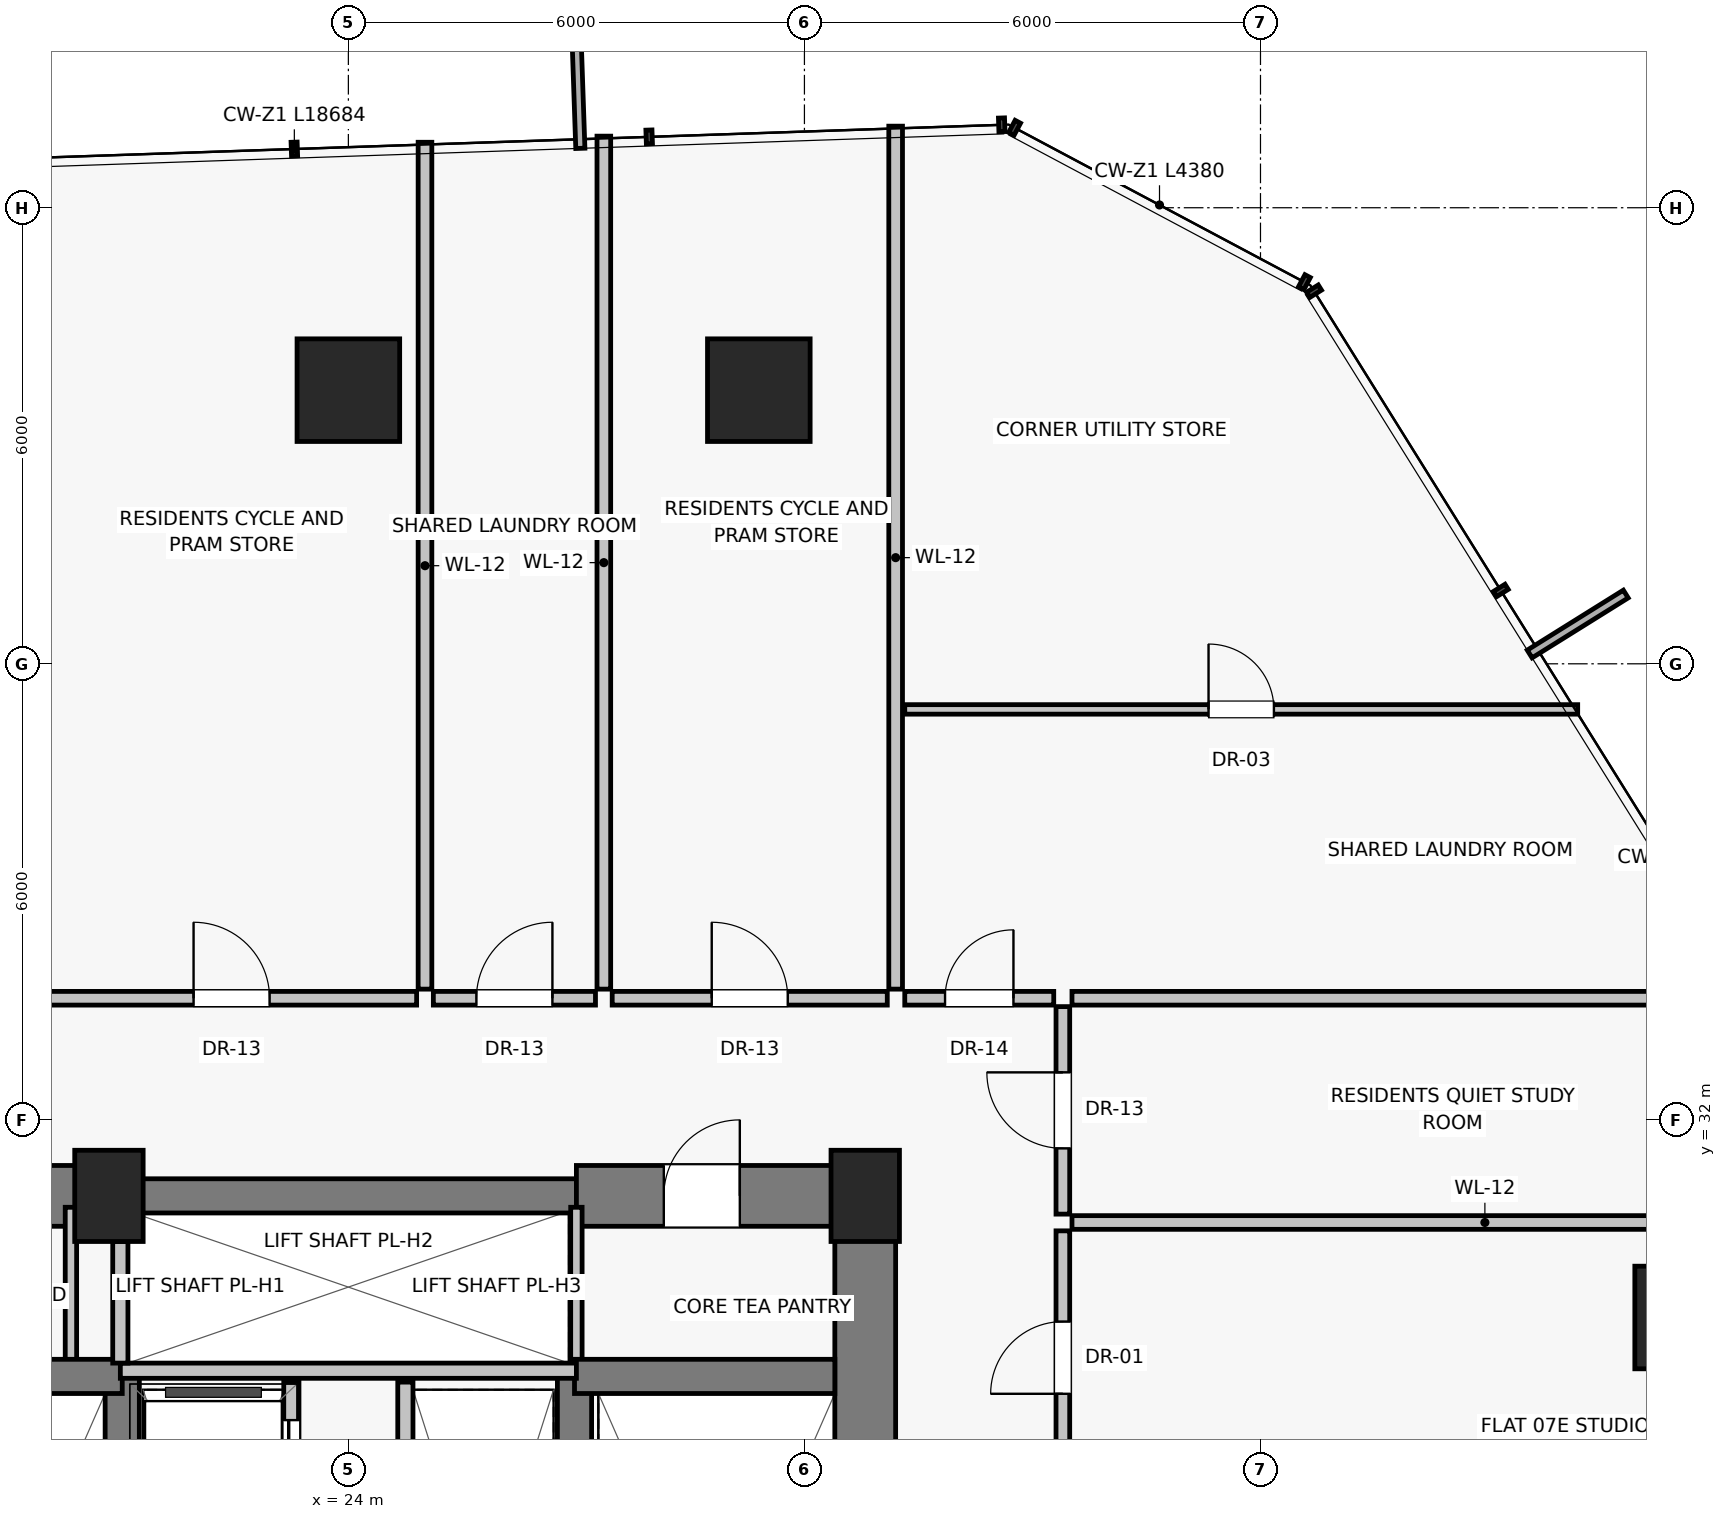
"""IFC4 building model, lengths in metres.
Left out: names, types, materials, properties, quantities, classifications, styles, units other than length and angle.
Written with IfcOpenShell. Run it as: python <this file> out.ifc"""

import sys

from ifc_helpers import new_model, si_unit, direction, frame, frame_2d, origin, origin_2d, place, context, subcontext, project, spatial, rectangle, extrude, source, transform, mapped, element, fill, save


model = new_model("IFC4")
c1 = context("Model", 3, precision=1e-05, world=origin(), true_north=direction((0.0, 1.0)))
c2 = subcontext(c1, "Body", "Model", "MODEL_VIEW")
j1 = project(units=[si_unit("LENGTHUNIT", "METRE"), si_unit("PLANEANGLEUNIT", "RADIAN")], contexts=[c1])
p1 = place(None, origin())
s1 = spatial("IfcSite", under=j1, at=p1, CompositionType="ELEMENT")
p2 = place(p1, origin())
s2 = spatial("IfcBuilding", under=s1, at=p2, CompositionType="ELEMENT")
p3 = place(p2, frame((0.0, 0.0, 30.55)))
s3 = spatial("IfcBuildingStorey", under=s2, at=p3, CompositionType="ELEMENT", Elevation=30.55)
for number, where, z_axis, x_axis in (
    (1, (20.85, 31.0, 0.0), (0.0, 0.0, 1.0), (1.0, 0.0, 0.0)),
    (2, (30.8, 31.0, 0.0), (0.0, 0.0, 1.0), (1.0, 0.0, 0.0)),
):
    element("IfcColumn", number, at=place(p3, frame(where, z_axis=z_axis, x_axis=x_axis)), inside=s3, PredefinedType="PILASTER", context=c2, shape_type="SweptSolid", body=[
        extrude(rectangle(XDim=0.9, YDim=1.2, at=origin_2d()), origin(), (0.0, 0.0, 1.0), 3.25),
    ])
for number, where, z_axis, x_axis in (
    (3, (41.6, 29.4, 0.0), (0.0, 0.0, 1.0), (1.0, 0.0, 0.0)),
    (4, (29.4, 41.6, 0.0), (0.0, 0.0, 1.0), (1.0, 0.0, 0.0)),
    (5, (24.0, 41.6, 0.0), (0.0, 0.0, 1.0), (1.0, 0.0, 0.0)),
):
    element("IfcColumn", number, at=place(p3, frame(where, z_axis=z_axis, x_axis=x_axis)), inside=s3, PredefinedType="COLUMN", context=c2, shape_type="SweptSolid", body=[
        extrude(rectangle(XDim=1.35, YDim=1.35, at=origin_2d()), origin(), (0.0, 0.0, 1.0), 3.25),
    ])
p4 = place(p3, frame((30.8, 16.8, 0.0), z_axis=(0.0, 0.0, 1.0), x_axis=(0.0, 1.0, 0.0)))
e6 = element("IfcWall", 6, at=p4, inside=s3, PredefinedType="SHEAR", context=c2, shape_type="SweptSolid", body=[
    extrude(rectangle(XDim=14.2, YDim=0.8, at=frame_2d((7.1, 0.0))), origin(), (0.0, 0.0, 1.0), 3.0),
])
p5 = place(p3, frame((17.2, 31.0, 0.0), z_axis=(0.0, 0.0, 1.0), x_axis=(1.0, 0.0, 0.0)))
e7 = element("IfcWall", 7, at=p5, inside=s3, PredefinedType="SHEAR", context=c2, shape_type="SweptSolid", body=[
    extrude(rectangle(XDim=3.8, YDim=0.8, at=frame_2d((1.9, 0.0))), origin(), (0.0, 0.0, 1.0), 3.0),
])
p6 = place(p5, frame((1.25, 0.0, 0.0)))
e8 = element("IfcOpeningElement", 8, at=p6, cuts=e7, PredefinedType="OPENING", context=c2, shape_type="SweptSolid", body=[
    extrude(rectangle(XDim=0.86, YDim=2.01, at=frame_2d((0.43, 1.005))), frame((0.0, 0.41, 0.0), z_axis=(0.0, -1.0, 0.0), x_axis=(1.0, 0.0, 0.0)), (0.0, 0.0, 1.0), 0.82),
])
p7 = place(p3, frame((21.0, 31.0, 0.0), z_axis=(0.0, 0.0, 1.0), x_axis=(1.0, 0.0, 0.0)))
e9 = element("IfcWall", 9, at=p7, inside=s3, PredefinedType="SHEAR", context=c2, shape_type="SweptSolid", body=[
    extrude(rectangle(XDim=6.0, YDim=0.45, at=frame_2d((3.0, 0.0))), origin(), (0.0, 0.0, 1.0), 3.0),
])
p8 = place(p3, frame((27.0, 31.0, 0.0), z_axis=(0.0, 0.0, 1.0), x_axis=(1.0, 0.0, 0.0)))
e10 = element("IfcWall", 10, at=p8, inside=s3, PredefinedType="SHEAR", context=c2, shape_type="SweptSolid", body=[
    extrude(rectangle(XDim=3.8, YDim=0.8, at=frame_2d((1.9, 0.0))), origin(), (0.0, 0.0, 1.0), 3.0),
])
p9 = place(p8, frame((1.15, 0.0, 0.0)))
e11 = element("IfcOpeningElement", 11, at=p9, cuts=e10, PredefinedType="OPENING", context=c2, shape_type="SweptSolid", body=[
    extrude(rectangle(XDim=1.0, YDim=2.01, at=frame_2d((0.5, 1.005))), frame((0.0, 0.41, 0.0), z_axis=(0.0, -1.0, 0.0), x_axis=(1.0, 0.0, 0.0)), (0.0, 0.0, 1.0), 0.82),
])
for number, where, z_axis, x_axis in (
    (12, (20.35, 28.65, 0.0), (0.0, 0.0, 1.0), (0.0, 1.0, 0.0)),
    (13, (27.0, 28.65, 0.0), (0.0, 0.0, 1.0), (0.0, 1.0, 0.0)),
):
    element("IfcWall", number, at=place(p3, frame(where, z_axis=z_axis, x_axis=x_axis)), inside=s3, PredefinedType="PARTITIONING", context=c2, shape_type="SweptSolid", body=[
        extrude(rectangle(XDim=2.2, YDim=0.15, at=frame_2d((1.1, 0.0))), origin(), (0.0, 0.0, 1.0), 3.0),
    ])
for number, where, z_axis, x_axis in (
    (14, (21.025, 19.8, 0.0), (0.0, 0.0, 1.0), (0.0, 1.0, 0.0)),
    (15, (26.975, 19.8, 0.0), (0.0, 0.0, 1.0), (0.0, 1.0, 0.0)),
):
    element("IfcWall", number, at=place(p3, frame(where, z_axis=z_axis, x_axis=x_axis)), inside=s3, PredefinedType="SHEAR", context=c2, shape_type="SweptSolid", body=[
        extrude(rectangle(XDim=8.825, YDim=0.45, at=frame_2d((4.413, 0.0))), origin(), (0.0, 0.0, 1.0), 3.0),
    ])
for number, where, z_axis, x_axis in (
    (16, (17.6, 28.625, 0.0), (0.0, 0.0, 1.0), (1.0, 0.0, 0.0)),
    (17, (26.975, 28.625, 0.0), (0.0, 0.0, 1.0), (1.0, 0.0, 0.0)),
):
    element("IfcWall", number, at=place(p3, frame(where, z_axis=z_axis, x_axis=x_axis)), inside=s3, PredefinedType="SHEAR", context=c2, shape_type="SweptSolid", body=[
        extrude(rectangle(XDim=3.425, YDim=0.45, at=frame_2d((1.712, 0.0))), origin(), (0.0, 0.0, 1.0), 3.0),
    ])
p10 = place(p3, frame((21.0, 28.7, 0.0), z_axis=(0.0, 0.0, 1.0), x_axis=(1.0, 0.0, 0.0)))
e18 = element("IfcWall", 18, at=p10, inside=s3, PredefinedType="SOLIDWALL", context=c2, shape_type="SweptSolid", body=[
    extrude(rectangle(XDim=6.0, YDim=0.2, at=frame_2d((3.0, 0.0))), origin(), (0.0, 0.0, 1.0), 3.0),
])
p11 = place(p3, frame((21.0, 28.8, 0.0), z_axis=(0.0, 0.0, 1.0), x_axis=(0.0, 1.0, 0.0)))
e19 = element("IfcWall", 19, at=p11, inside=s3, PredefinedType="SOLIDWALL", context=c2, shape_type="SweptSolid", body=[
    extrude(rectangle(XDim=1.6, YDim=0.2, at=frame_2d((0.8, 0.0))), origin(), (0.0, 0.0, 1.0), 3.0),
])
p12 = place(p3, frame((23.25, 22.6, 0.0), z_axis=(0.0, 0.0, 1.0), x_axis=(0.0, 1.0, 0.0)))
e20 = element("IfcWall", 20, at=p12, inside=s3, PredefinedType="SOLIDWALL", context=c2, shape_type="SweptSolid", body=[
    extrude(rectangle(XDim=5.95, YDim=0.2, at=frame_2d((2.975, 0.0))), origin(), (0.0, 0.0, 1.0), 3.0),
])
p13 = place(p12, frame((0.45, 0.0, 0.0)))
e21 = element("IfcOpeningElement", 21, at=p13, cuts=e20, PredefinedType="OPENING", context=c2, shape_type="SweptSolid", body=[
    extrude(rectangle(XDim=1.1, YDim=2.08, at=frame_2d((0.55, 1.04))), frame((0.0, 0.11, 0.0), z_axis=(0.0, -1.0, 0.0), x_axis=(1.0, 0.0, 0.0)), (0.0, 0.0, 1.0), 0.22),
])
p14 = place(p12, frame((2.4, 0.0, 0.0)))
e22 = element("IfcOpeningElement", 22, at=p14, cuts=e20, PredefinedType="OPENING", context=c2, shape_type="SweptSolid", body=[
    extrude(rectangle(XDim=1.1, YDim=2.08, at=frame_2d((0.55, 1.04))), frame((0.0, 0.11, 0.0), z_axis=(0.0, -1.0, 0.0), x_axis=(1.0, 0.0, 0.0)), (0.0, 0.0, 1.0), 0.22),
])
p15 = place(p12, frame((4.35, 0.0, 0.0)))
e23 = element("IfcOpeningElement", 23, at=p15, cuts=e20, PredefinedType="OPENING", context=c2, shape_type="SweptSolid", body=[
    extrude(rectangle(XDim=1.1, YDim=2.08, at=frame_2d((0.55, 1.04))), frame((0.0, 0.11, 0.0), z_axis=(0.0, -1.0, 0.0), x_axis=(1.0, 0.0, 0.0)), (0.0, 0.0, 1.0), 0.22),
])
p16 = place(p3, frame((24.75, 22.6, 0.0), z_axis=(0.0, 0.0, 1.0), x_axis=(0.0, 1.0, 0.0)))
e24 = element("IfcWall", 24, at=p16, inside=s3, PredefinedType="SOLIDWALL", context=c2, shape_type="SweptSolid", body=[
    extrude(rectangle(XDim=5.95, YDim=0.2, at=frame_2d((2.975, 0.0))), origin(), (0.0, 0.0, 1.0), 3.0),
])
p17 = place(p3, frame((31.2, 33.72, 0.0), z_axis=(0.0, 0.0, 1.0), x_axis=(0.0, 1.0, 0.0)))
e25 = element("IfcWall", 25, at=p17, inside=s3, PredefinedType="PARTITIONING", context=c2, shape_type="SweptSolid", body=[
    extrude(rectangle(XDim=11.353, YDim=0.18, at=frame_2d((5.677, 0.0))), origin(), (0.0, 0.0, 1.0), 3.0),
])
p18 = place(p3, frame((20.029, 33.6, 0.0), z_axis=(0.0, 0.0, 1.0), x_axis=(1.0, 0.0, 0.0)))
e26 = element("IfcWall", 26, at=p18, inside=s3, PredefinedType="PARTITIONING", context=c2, shape_type="SweptSolid", body=[
    extrude(rectangle(XDim=4.869, YDim=0.18, at=frame_2d((2.435, 0.0))), origin(), (0.0, 0.0, 1.0), 3.0),
])
p19 = place(p18, frame((1.935, 0.0, 0.0)))
e27 = element("IfcOpeningElement", 27, at=p19, cuts=e26, PredefinedType="OPENING", context=c2, shape_type="SweptSolid", body=[
    extrude(rectangle(XDim=1.0, YDim=2.01, at=frame_2d((0.5, 1.005))), frame((0.0, 0.1, 0.0), z_axis=(0.0, -1.0, 0.0), x_axis=(1.0, 0.0, 0.0)), (0.0, 0.0, 1.0), 0.2),
])
p20 = place(p3, frame((25.008, 33.72, 0.0), z_axis=(0.0, 0.0, 1.0), x_axis=(0.0, 1.0, 0.0)))
e28 = element("IfcWall", 28, at=p20, inside=s3, PredefinedType="PARTITIONING", context=c2, shape_type="SweptSolid", body=[
    extrude(rectangle(XDim=11.141, YDim=0.18, at=frame_2d((5.571, 0.0))), origin(), (0.0, 0.0, 1.0), 3.0),
])
p21 = place(p3, frame((25.118, 33.6, 0.0), z_axis=(0.0, 0.0, 1.0), x_axis=(1.0, 0.0, 0.0)))
e29 = element("IfcWall", 29, at=p21, inside=s3, PredefinedType="PARTITIONING", context=c2, shape_type="SweptSolid", body=[
    extrude(rectangle(XDim=2.133, YDim=0.18, at=frame_2d((1.066, 0.0))), origin(), (0.0, 0.0, 1.0), 3.0),
])
p22 = place(p21, frame((0.566, 0.0, 0.0)))
e30 = element("IfcOpeningElement", 30, at=p22, cuts=e29, PredefinedType="OPENING", context=c2, shape_type="SweptSolid", body=[
    extrude(rectangle(XDim=1.0, YDim=2.01, at=frame_2d((0.5, 1.005))), frame((0.0, 0.1, 0.0), z_axis=(0.0, -1.0, 0.0), x_axis=(1.0, 0.0, 0.0)), (0.0, 0.0, 1.0), 0.2),
])
p23 = place(p3, frame((27.471, 33.6, 0.0), z_axis=(0.0, 0.0, 1.0), x_axis=(1.0, 0.0, 0.0)))
e31 = element("IfcWall", 31, at=p23, inside=s3, PredefinedType="PARTITIONING", context=c2, shape_type="SweptSolid", body=[
    extrude(rectangle(XDim=3.619, YDim=0.18, at=frame_2d((1.81, 0.0))), origin(), (0.0, 0.0, 1.0), 3.0),
])
p24 = place(p23, frame((1.31, 0.0, 0.0)))
e32 = element("IfcOpeningElement", 32, at=p24, cuts=e31, PredefinedType="OPENING", context=c2, shape_type="SweptSolid", body=[
    extrude(rectangle(XDim=1.0, YDim=2.01, at=frame_2d((0.5, 1.005))), frame((0.0, 0.1, 0.0), z_axis=(0.0, -1.0, 0.0), x_axis=(1.0, 0.0, 0.0)), (0.0, 0.0, 1.0), 0.2),
])
p25 = place(p3, frame((27.361, 33.72, 0.0), z_axis=(0.0, 0.0, 1.0), x_axis=(0.0, 1.0, 0.0)))
e33 = element("IfcWall", 33, at=p25, inside=s3, PredefinedType="PARTITIONING", context=c2, shape_type="SweptSolid", body=[
    extrude(rectangle(XDim=11.222, YDim=0.18, at=frame_2d((5.611, 0.0))), origin(), (0.0, 0.0, 1.0), 3.0),
])
p26 = place(p3, frame((33.52, 33.6, 0.0), z_axis=(0.0, 0.0, 1.0), x_axis=(1.0, 0.0, 0.0)))
e34 = element("IfcWall", 34, at=p26, inside=s3, PredefinedType="PARTITIONING", context=c2, shape_type="SweptSolid", body=[
    extrude(rectangle(XDim=9.024, YDim=0.18, at=frame_2d((4.512, 0.0))), origin(), (0.0, 0.0, 1.0), 3.0),
])
p27 = place(p3, frame((33.4, 30.76, 0.0), z_axis=(0.0, 0.0, 1.0), x_axis=(0.0, 1.0, 0.0)))
e35 = element("IfcWall", 35, at=p27, inside=s3, PredefinedType="PARTITIONING", context=c2, shape_type="SweptSolid", body=[
    extrude(rectangle(XDim=2.73, YDim=0.18, at=frame_2d((1.365, 0.0))), origin(), (0.0, 0.0, 1.0), 3.0),
])
p28 = place(p27, frame((0.865, 0.0, 0.0)))
e36 = element("IfcOpeningElement", 36, at=p28, cuts=e35, PredefinedType="OPENING", context=c2, shape_type="SweptSolid", body=[
    extrude(rectangle(XDim=1.0, YDim=2.01, at=frame_2d((0.5, 1.005))), frame((0.0, 0.1, 0.0), z_axis=(0.0, -1.0, 0.0), x_axis=(1.0, 0.0, 0.0)), (0.0, 0.0, 1.0), 0.2),
])
p29 = place(p3, frame((33.52, 30.65, 0.0), z_axis=(0.0, 0.0, 1.0), x_axis=(1.0, 0.0, 0.0)))
e37 = element("IfcWall", 37, at=p29, inside=s3, PredefinedType="PARTITIONING", context=c2, shape_type="SweptSolid", body=[
    extrude(rectangle(XDim=10.865, YDim=0.18, at=frame_2d((5.432, 0.0))), origin(), (0.0, 0.0, 1.0), 2.299),
])
p30 = place(p3, frame((33.4, 25.368, 0.0), z_axis=(0.0, 0.0, 1.0), x_axis=(0.0, 1.0, 0.0)))
e38 = element("IfcWall", 38, at=p30, inside=s3, PredefinedType="PARTITIONING", context=c2, shape_type="SweptSolid", body=[
    extrude(rectangle(XDim=5.172, YDim=0.18, at=frame_2d((2.586, 0.0))), origin(), (0.0, 0.0, 1.0), 3.0),
])
p31 = place(p30, frame((3.028, 0.0, 0.0)))
e39 = element("IfcOpeningElement", 39, at=p31, cuts=e38, PredefinedType="OPENING", context=c2, shape_type="SweptSolid", body=[
    extrude(rectangle(XDim=0.95, YDim=2.02, at=frame_2d((0.475, 1.01))), frame((0.0, 0.1, 0.0), z_axis=(0.0, -1.0, 0.0), x_axis=(1.0, 0.0, 0.0)), (0.0, 0.0, 1.0), 0.2),
])
p32 = place(p3, frame((31.32, 33.6, 0.0), z_axis=(0.0, 0.0, 1.0), x_axis=(1.0, 0.0, 0.0)))
e40 = element("IfcWall", 40, at=p32, inside=s3, PredefinedType="PARTITIONING", context=c2, shape_type="SweptSolid", body=[
    extrude(rectangle(XDim=1.96, YDim=0.18, at=frame_2d((0.98, 0.0))), origin(), (0.0, 0.0, 1.0), 3.0),
])
p33 = place(p32, frame((0.53, 0.0, 0.0)))
e41 = element("IfcOpeningElement", 41, at=p33, cuts=e40, PredefinedType="OPENING", context=c2, shape_type="SweptSolid", body=[
    extrude(rectangle(XDim=0.9, YDim=2.01, at=frame_2d((0.45, 1.005))), frame((0.0, 0.1, 0.0), z_axis=(0.0, -1.0, 0.0), x_axis=(1.0, 0.0, 0.0)), (0.0, 0.0, 1.0), 0.2),
])
p34 = place(p3, frame((31.32, 37.4, 0.0), z_axis=(0.0, 0.0, 1.0), x_axis=(1.0, 0.0, 0.0)))
e42 = element("IfcWall", 42, at=p34, inside=s3, PredefinedType="PARTITIONING", context=c2, shape_type="SweptSolid", body=[
    extrude(rectangle(XDim=8.853, YDim=0.125, at=frame_2d((4.427, 0.0))), origin(), (0.0, 0.0, 1.0), 3.0),
])
p35 = place(p34, frame((3.997, 0.0, 0.0)))
e43 = element("IfcOpeningElement", 43, at=p35, cuts=e42, PredefinedType="OPENING", context=c2, shape_type="SweptSolid", body=[
    extrude(rectangle(XDim=0.86, YDim=2.01, at=frame_2d((0.43, 1.005))), frame((0.0, 0.073, 0.0), z_axis=(0.0, -1.0, 0.0), x_axis=(1.0, 0.0, 0.0)), (0.0, 0.0, 1.0), 0.145),
])
m1 = source(origin(), c2, "Body", "SweptSolid", [
    extrude(rectangle(XDim=1.0, YDim=2.01, at=frame_2d((0.5, 1.005))), frame((0.0, 0.025, 0.0), z_axis=(0.0, -1.0, 0.0), x_axis=(1.0, 0.0, 0.0)), (0.0, 0.0, 1.0), 0.05),
])
p36 = place(p9, origin())
e44 = element("IfcDoor", 44, at=p36, inside=s3, OperationType="SINGLE_SWING_RIGHT", PredefinedType="DOOR", context=c2, shape_type="MappedRepresentation", body=[
    mapped(m1, transform((0.0, 0.0, 0.0), scale=1.0)),
])
fill(e11, e44)
m2 = source(origin(), c2, "Body", "SweptSolid", [
    extrude(rectangle(XDim=1.1, YDim=2.08, at=frame_2d((0.55, 1.04))), frame((0.0, 0.025, 0.0), z_axis=(0.0, -1.0, 0.0), x_axis=(1.0, 0.0, 0.0)), (0.0, 0.0, 1.0), 0.05),
])
p37 = place(p15, origin())
e45 = element("IfcDoor", 45, at=p37, inside=s3, OperationType="SLIDING_TO_LEFT", PredefinedType="DOOR", context=c2, shape_type="MappedRepresentation", body=[
    mapped(m2, transform((0.0, 0.0, 0.0), scale=1.0)),
])
fill(e23, e45)
p38 = place(p19, origin())
e46 = element("IfcDoor", 46, at=p38, inside=s3, OperationType="SINGLE_SWING_LEFT", PredefinedType="DOOR", context=c2, shape_type="MappedRepresentation", body=[
    mapped(m1, transform((0.0, 0.0, 0.0), scale=1.0)),
])
fill(e27, e46)
p39 = place(p22, origin())
e47 = element("IfcDoor", 47, at=p39, inside=s3, OperationType="SINGLE_SWING_RIGHT", PredefinedType="DOOR", context=c2, shape_type="MappedRepresentation", body=[
    mapped(m1, transform((0.0, 0.0, 0.0), scale=1.0)),
])
fill(e30, e47)
p40 = place(p24, origin())
e48 = element("IfcDoor", 48, at=p40, inside=s3, OperationType="SINGLE_SWING_LEFT", PredefinedType="DOOR", context=c2, shape_type="MappedRepresentation", body=[
    mapped(m1, transform((0.0, 0.0, 0.0), scale=1.0)),
])
fill(e32, e48)
p41 = place(p28, origin())
e49 = element("IfcDoor", 49, at=p41, inside=s3, OperationType="SINGLE_SWING_RIGHT", PredefinedType="DOOR", context=c2, shape_type="MappedRepresentation", body=[
    mapped(m1, transform((0.0, 0.0, 0.0), scale=1.0)),
])
fill(e36, e49)
m3 = source(origin(), c2, "Body", "SweptSolid", [
    extrude(rectangle(XDim=0.95, YDim=2.02, at=frame_2d((0.475, 1.01))), frame((0.0, 0.025, 0.0), z_axis=(0.0, -1.0, 0.0), x_axis=(1.0, 0.0, 0.0)), (0.0, 0.0, 1.0), 0.05),
])
p42 = place(p31, origin())
e50 = element("IfcDoor", 50, at=p42, inside=s3, OperationType="SINGLE_SWING_LEFT", PredefinedType="DOOR", context=c2, shape_type="MappedRepresentation", body=[
    mapped(m3, transform((0.0, 0.0, 0.0), scale=1.0)),
])
fill(e39, e50)
m4 = source(origin(), c2, "Body", "SweptSolid", [
    extrude(rectangle(XDim=0.9, YDim=2.01, at=frame_2d((0.45, 1.005))), frame((0.0, 0.025, 0.0), z_axis=(0.0, -1.0, 0.0), x_axis=(1.0, 0.0, 0.0)), (0.0, 0.0, 1.0), 0.05),
])
p43 = place(p33, origin())
e51 = element("IfcDoor", 51, at=p43, inside=s3, OperationType="SINGLE_SWING_RIGHT", PredefinedType="DOOR", context=c2, shape_type="MappedRepresentation", body=[
    mapped(m4, transform((0.0, 0.0, 0.0), scale=1.0)),
])
fill(e41, e51)
m5 = source(origin(), c2, "Body", "SweptSolid", [
    extrude(rectangle(XDim=0.86, YDim=2.01, at=frame_2d((0.43, 1.005))), frame((0.0, 0.025, 0.0), z_axis=(0.0, -1.0, 0.0), x_axis=(1.0, 0.0, 0.0)), (0.0, 0.0, 1.0), 0.05),
])
p44 = place(p35, origin())
e52 = element("IfcDoor", 52, at=p44, inside=s3, OperationType="SINGLE_SWING_LEFT", PredefinedType="DOOR", context=c2, shape_type="MappedRepresentation", body=[
    mapped(m5, transform((0.0, 0.0, 0.0), scale=1.0)),
])
fill(e43, e52)
save(model, sys.argv[1])
